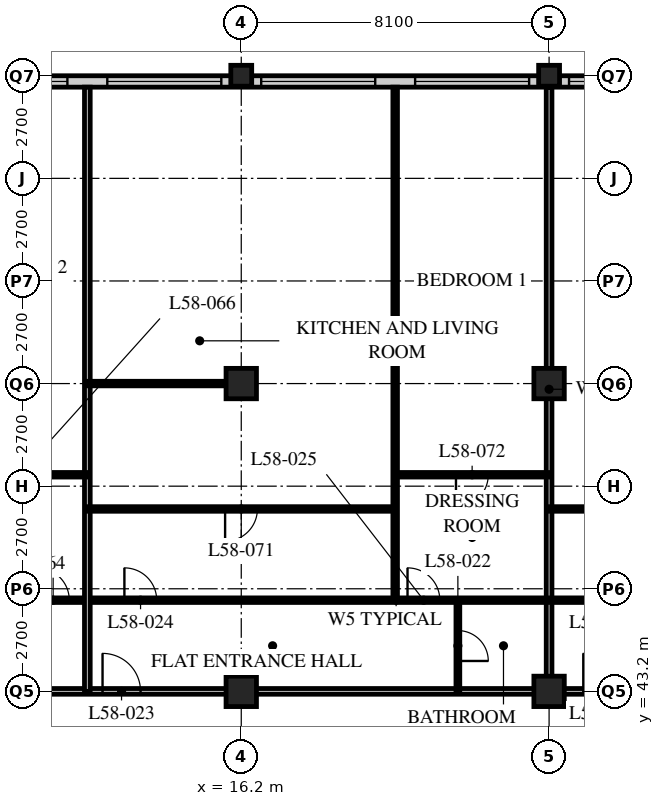
"""IFC4 building model, lengths in metres.
Left out: names, types, materials, properties, quantities, classifications, styles, units other than length and angle.
Written with IfcOpenShell. Run it as: python <this file> out.ifc"""

import sys

from ifc_helpers import new_model, si_unit, direction, frame, frame_2d, origin, origin_2d, place, context, subcontext, project, spatial, rectangle, hollow_rectangle, extrude, element, fill, save


model = new_model("IFC4")
c1 = context("Model", 3, precision=1e-05, world=origin(), true_north=direction((0.0, 1.0)))
c2 = subcontext(c1, "Body", "Model", "MODEL_VIEW")
j1 = project(units=[si_unit("LENGTHUNIT", "METRE"), si_unit("PLANEANGLEUNIT", "RADIAN")], contexts=[c1])
p1 = place(None, origin())
s1 = spatial("IfcSite", under=j1, at=p1, CompositionType="ELEMENT")
p2 = place(p1, origin())
s2 = spatial("IfcBuilding", under=s1, at=p2, CompositionType="ELEMENT")
p3 = place(p2, frame((0.0, 0.0, 224.4)))
s3 = spatial("IfcBuildingStorey", under=s2, at=p3, CompositionType="ELEMENT", Elevation=224.4)
for number, where, z_axis, x_axis in (
    (1, (16.2, 43.2, 0.0), (0.0, 0.0, 1.0), (1.0, 0.0, 0.0)),
    (2, (16.2, 51.3, 0.0), (0.0, 0.0, 1.0), (1.0, 0.0, 0.0)),
):
    element("IfcColumn", number, at=place(p3, frame(where, z_axis=z_axis, x_axis=x_axis)), inside=s3, PredefinedType="COLUMN", context=c2, shape_type="SweptSolid", body=[
        extrude(hollow_rectangle(XDim=0.8, YDim=0.8, WallThickness=0.08, at=origin_2d()), origin(), (0.0, 0.0, 1.0), 3.6),
    ])
p4 = place(p3, frame((16.2, 59.4, 0.0), z_axis=(0.0, 0.0, 1.0), x_axis=(1.0, 0.0, 0.0)))
e3 = element("IfcColumn", 3, at=p4, inside=s3, PredefinedType="COLUMN", context=c2, shape_type="SweptSolid", body=[
    extrude(hollow_rectangle(XDim=0.55, YDim=0.55, WallThickness=0.045, at=origin_2d()), origin(), (0.0, 0.0, 1.0), 3.6),
])
for number, where, z_axis, x_axis in (
    (4, (24.3, 43.2, 0.0), (0.0, 0.0, 1.0), (1.0, 0.0, 0.0)),
    (5, (24.3, 51.3, 0.0), (0.0, 0.0, 1.0), (1.0, 0.0, 0.0)),
):
    element("IfcColumn", number, at=place(p3, frame(where, z_axis=z_axis, x_axis=x_axis)), inside=s3, PredefinedType="COLUMN", context=c2, shape_type="SweptSolid", body=[
        extrude(hollow_rectangle(XDim=0.8, YDim=0.8, WallThickness=0.08, at=origin_2d()), origin(), (0.0, 0.0, 1.0), 3.6),
    ])
p5 = place(p3, frame((24.3, 59.4, 0.0), z_axis=(0.0, 0.0, 1.0), x_axis=(1.0, 0.0, 0.0)))
e6 = element("IfcColumn", 6, at=p5, inside=s3, PredefinedType="COLUMN", context=c2, shape_type="SweptSolid", body=[
    extrude(hollow_rectangle(XDim=0.55, YDim=0.55, WallThickness=0.045, at=origin_2d()), origin(), (0.0, 0.0, 1.0), 3.6),
])
p6 = place(p3, frame((48.3, 59.25, 0.0), z_axis=(0.0, 0.0, 1.0), x_axis=(-1.0, 0.0, 0.0)))
e7 = element("IfcWall", 7, at=p6, inside=s3, PredefinedType="SOLIDWALL", context=c2, shape_type="SweptSolid", body=[
    extrude(rectangle(XDim=40.2, YDim=0.3, at=frame_2d((20.1, 0.0))), origin(), (0.0, 0.0, 1.0), 3.39),
])
p7 = place(p6, frame((0.225, 0.0, 0.6)))
e8 = element("IfcOpeningElement", 8, at=p7, cuts=e7, PredefinedType="OPENING", context=c2, shape_type="SweptSolid", body=[
    extrude(rectangle(XDim=3.0, YDim=2.0, at=frame_2d((1.5, 1.0))), frame((0.0, 0.16, 0.0), z_axis=(0.0, -1.0, 0.0), x_axis=(1.0, 0.0, 0.0)), (0.0, 0.0, 1.0), 0.32),
])
p8 = place(p6, frame((4.275, 0.0, 0.6)))
e9 = element("IfcOpeningElement", 9, at=p8, cuts=e7, PredefinedType="OPENING", context=c2, shape_type="SweptSolid", body=[
    extrude(rectangle(XDim=3.0, YDim=2.0, at=frame_2d((1.5, 1.0))), frame((0.0, 0.16, 0.0), z_axis=(0.0, -1.0, 0.0), x_axis=(1.0, 0.0, 0.0)), (0.0, 0.0, 1.0), 0.32),
])
p9 = place(p6, frame((8.325, 0.0, 0.6)))
e10 = element("IfcOpeningElement", 10, at=p9, cuts=e7, PredefinedType="OPENING", context=c2, shape_type="SweptSolid", body=[
    extrude(rectangle(XDim=3.0, YDim=2.0, at=frame_2d((1.5, 1.0))), frame((0.0, 0.16, 0.0), z_axis=(0.0, -1.0, 0.0), x_axis=(1.0, 0.0, 0.0)), (0.0, 0.0, 1.0), 0.32),
])
p10 = place(p6, frame((12.375, 0.0, 0.6)))
e11 = element("IfcOpeningElement", 11, at=p10, cuts=e7, PredefinedType="OPENING", context=c2, shape_type="SweptSolid", body=[
    extrude(rectangle(XDim=3.0, YDim=2.0, at=frame_2d((1.5, 1.0))), frame((0.0, 0.16, 0.0), z_axis=(0.0, -1.0, 0.0), x_axis=(1.0, 0.0, 0.0)), (0.0, 0.0, 1.0), 0.32),
])
p11 = place(p6, frame((16.425, 0.0, 0.6)))
e12 = element("IfcOpeningElement", 12, at=p11, cuts=e7, PredefinedType="OPENING", context=c2, shape_type="SweptSolid", body=[
    extrude(rectangle(XDim=3.0, YDim=2.0, at=frame_2d((1.5, 1.0))), frame((0.0, 0.16, 0.0), z_axis=(0.0, -1.0, 0.0), x_axis=(1.0, 0.0, 0.0)), (0.0, 0.0, 1.0), 0.32),
])
p12 = place(p6, frame((20.475, 0.0, 0.6)))
e13 = element("IfcOpeningElement", 13, at=p12, cuts=e7, PredefinedType="OPENING", context=c2, shape_type="SweptSolid", body=[
    extrude(rectangle(XDim=3.0, YDim=2.0, at=frame_2d((1.5, 1.0))), frame((0.0, 0.16, 0.0), z_axis=(0.0, -1.0, 0.0), x_axis=(1.0, 0.0, 0.0)), (0.0, 0.0, 1.0), 0.32),
])
p13 = place(p6, frame((24.525, 0.0, 0.6)))
e14 = element("IfcOpeningElement", 14, at=p13, cuts=e7, PredefinedType="OPENING", context=c2, shape_type="SweptSolid", body=[
    extrude(rectangle(XDim=3.0, YDim=2.0, at=frame_2d((1.5, 1.0))), frame((0.0, 0.16, 0.0), z_axis=(0.0, -1.0, 0.0), x_axis=(1.0, 0.0, 0.0)), (0.0, 0.0, 1.0), 0.32),
])
p14 = place(p6, frame((28.575, 0.0, 0.6)))
e15 = element("IfcOpeningElement", 15, at=p14, cuts=e7, PredefinedType="OPENING", context=c2, shape_type="SweptSolid", body=[
    extrude(rectangle(XDim=3.0, YDim=2.0, at=frame_2d((1.5, 1.0))), frame((0.0, 0.16, 0.0), z_axis=(0.0, -1.0, 0.0), x_axis=(1.0, 0.0, 0.0)), (0.0, 0.0, 1.0), 0.32),
])
p15 = place(p6, frame((32.625, 0.0, 0.6)))
e16 = element("IfcOpeningElement", 16, at=p15, cuts=e7, PredefinedType="OPENING", context=c2, shape_type="SweptSolid", body=[
    extrude(rectangle(XDim=3.0, YDim=2.0, at=frame_2d((1.5, 1.0))), frame((0.0, 0.16, 0.0), z_axis=(0.0, -1.0, 0.0), x_axis=(1.0, 0.0, 0.0)), (0.0, 0.0, 1.0), 0.32),
])
p16 = place(p6, frame((36.675, 0.0, 0.6)))
e17 = element("IfcOpeningElement", 17, at=p16, cuts=e7, PredefinedType="OPENING", context=c2, shape_type="SweptSolid", body=[
    extrude(rectangle(XDim=3.0, YDim=2.0, at=frame_2d((1.5, 1.0))), frame((0.0, 0.16, 0.0), z_axis=(0.0, -1.0, 0.0), x_axis=(1.0, 0.0, 0.0)), (0.0, 0.0, 1.0), 0.32),
])
p17 = place(p3, frame((8.1, 43.2, 0.0), z_axis=(0.0, 0.0, 1.0), x_axis=(1.0, 0.0, 0.0)))
e18 = element("IfcWall", 18, at=p17, inside=s3, PredefinedType="PARTITIONING", context=c2, shape_type="SweptSolid", body=[
    extrude(rectangle(XDim=36.45, YDim=0.15, at=frame_2d((18.225, 0.0))), origin(), (0.0, 0.0, 1.0), 2.628),
])
p18 = place(p17, frame((4.45, 0.0, 0.0)))
e19 = element("IfcOpeningElement", 19, at=p18, cuts=e18, PredefinedType="OPENING", context=c2, shape_type="SweptSolid", body=[
    extrude(rectangle(XDim=1.0, YDim=2.1, at=frame_2d((0.5, 1.05))), frame((0.0, 0.085, 0.0), z_axis=(0.0, -1.0, 0.0), x_axis=(1.0, 0.0, 0.0)), (0.0, 0.0, 1.0), 0.17),
])
p19 = place(p17, frame((17.1, 0.0, 0.0)))
e20 = element("IfcOpeningElement", 20, at=p19, cuts=e18, PredefinedType="OPENING", context=c2, shape_type="SweptSolid", body=[
    extrude(rectangle(XDim=1.0, YDim=2.1, at=frame_2d((0.5, 1.05))), frame((0.0, 0.085, 0.0), z_axis=(0.0, -1.0, 0.0), x_axis=(1.0, 0.0, 0.0)), (0.0, 0.0, 1.0), 0.17),
])
p20 = place(p17, frame((29.05, 0.0, 0.0)))
e21 = element("IfcOpeningElement", 21, at=p20, cuts=e18, PredefinedType="OPENING", context=c2, shape_type="SweptSolid", body=[
    extrude(rectangle(XDim=1.0, YDim=2.1, at=frame_2d((0.5, 1.05))), frame((0.0, 0.085, 0.0), z_axis=(0.0, -1.0, 0.0), x_axis=(1.0, 0.0, 0.0)), (0.0, 0.0, 1.0), 0.17),
])
p21 = place(p17, frame((33.925, 0.0, 0.0)))
e22 = element("IfcOpeningElement", 22, at=p21, cuts=e18, PredefinedType="OPENING", context=c2, shape_type="SweptSolid", body=[
    extrude(rectangle(XDim=1.0, YDim=2.1, at=frame_2d((0.5, 1.05))), frame((0.0, 0.085, 0.0), z_axis=(0.0, -1.0, 0.0), x_axis=(1.0, 0.0, 0.0)), (0.0, 0.0, 1.0), 0.17),
])
p22 = place(p17, frame((1.525, 0.0, 0.0)))
e23 = element("IfcOpeningElement", 23, at=p22, cuts=e18, PredefinedType="OPENING", context=c2, shape_type="SweptSolid", body=[
    extrude(rectangle(XDim=1.0, YDim=2.1, at=frame_2d((0.5, 1.05))), frame((0.0, 0.085, 0.0), z_axis=(0.0, -1.0, 0.0), x_axis=(1.0, 0.0, 0.0)), (0.0, 0.0, 1.0), 0.17),
])
p23 = place(p3, frame((21.9, 43.2, 0.0), z_axis=(0.0, 0.0, 1.0), x_axis=(0.0, 1.0, 0.0)))
e24 = element("IfcWall", 24, at=p23, inside=s3, PredefinedType="PARTITIONING", context=c2, shape_type="SweptSolid", body=[
    extrude(rectangle(XDim=2.4, YDim=0.1, at=frame_2d((1.2, 0.0))), origin(), (0.0, 0.0, 1.0), 3.39),
])
p24 = place(p23, frame((0.8, 0.0, 0.0)))
e25 = element("IfcOpeningElement", 25, at=p24, cuts=e24, PredefinedType="OPENING", context=c2, shape_type="SweptSolid", body=[
    extrude(rectangle(XDim=0.8, YDim=2.1, at=frame_2d((0.4, 1.05))), frame((0.0, 0.06, 0.0), z_axis=(0.0, -1.0, 0.0), x_axis=(1.0, 0.0, 0.0)), (0.0, 0.0, 1.0), 0.12),
])
p25 = place(p3, frame((20.25, 45.6, 0.0), z_axis=(0.0, 0.0, 1.0), x_axis=(0.0, 1.0, 0.0)))
e26 = element("IfcWall", 26, at=p25, inside=s3, PredefinedType="PARTITIONING", context=c2, shape_type="SweptSolid", body=[
    extrude(rectangle(XDim=13.5, YDim=0.12, at=frame_2d((6.75, 0.0))), origin(), (0.0, 0.0, 1.0), 3.39),
])
p26 = place(p3, frame((24.3, 43.2, 0.0), z_axis=(0.0, 0.0, 1.0), x_axis=(0.0, 1.0, 0.0)))
e27 = element("IfcWall", 27, at=p26, inside=s3, PredefinedType="PARTITIONING", context=c2, shape_type="SweptSolid", body=[
    extrude(rectangle(XDim=15.9, YDim=0.15, at=frame_2d((7.95, 0.0))), origin(), (0.0, 0.0, 1.0), 2.628),
])
p27 = place(p3, frame((4.1, 45.6, 0.0), z_axis=(0.0, 0.0, 1.0), x_axis=(1.0, 0.0, 0.0)))
e28 = element("IfcWall", 28, at=p27, inside=s3, PredefinedType="PARTITIONING", context=c2, shape_type="SweptSolid", body=[
    extrude(rectangle(XDim=32.35, YDim=0.12, at=frame_2d((16.175, 0.0))), origin(), (0.0, 0.0, 1.0), 3.39),
])
p28 = place(p27, frame((9.025, 0.0, 0.0)))
e29 = element("IfcOpeningElement", 29, at=p28, cuts=e28, PredefinedType="OPENING", context=c2, shape_type="SweptSolid", body=[
    extrude(rectangle(XDim=0.85, YDim=2.1, at=frame_2d((0.425, 1.05))), frame((0.0, 0.07, 0.0), z_axis=(0.0, -1.0, 0.0), x_axis=(1.0, 0.0, 0.0)), (0.0, 0.0, 1.0), 0.14),
])
p29 = place(p27, frame((16.475, 0.0, 0.0)))
e30 = element("IfcOpeningElement", 30, at=p29, cuts=e28, PredefinedType="OPENING", context=c2, shape_type="SweptSolid", body=[
    extrude(rectangle(XDim=0.85, YDim=2.1, at=frame_2d((0.425, 1.05))), frame((0.0, 0.07, 0.0), z_axis=(0.0, -1.0, 0.0), x_axis=(1.0, 0.0, 0.0)), (0.0, 0.0, 1.0), 0.14),
])
p30 = place(p27, frame((21.175, 0.0, 0.0)))
e31 = element("IfcOpeningElement", 31, at=p30, cuts=e28, PredefinedType="OPENING", context=c2, shape_type="SweptSolid", body=[
    extrude(rectangle(XDim=0.85, YDim=2.1, at=frame_2d((0.425, 1.05))), frame((0.0, 0.07, 0.0), z_axis=(0.0, -1.0, 0.0), x_axis=(1.0, 0.0, 0.0)), (0.0, 0.0, 1.0), 0.14),
])
p31 = place(p27, frame((28.625, 0.0, 0.0)))
e32 = element("IfcOpeningElement", 32, at=p31, cuts=e28, PredefinedType="OPENING", context=c2, shape_type="SweptSolid", body=[
    extrude(rectangle(XDim=0.85, YDim=2.1, at=frame_2d((0.425, 1.05))), frame((0.0, 0.07, 0.0), z_axis=(0.0, -1.0, 0.0), x_axis=(1.0, 0.0, 0.0)), (0.0, 0.0, 1.0), 0.14),
])
p32 = place(p27, frame((6.725, 0.0, 0.0)))
e33 = element("IfcOpeningElement", 33, at=p32, cuts=e28, PredefinedType="OPENING", context=c2, shape_type="SweptSolid", body=[
    extrude(rectangle(XDim=0.85, YDim=2.1, at=frame_2d((0.425, 1.05))), frame((0.0, 0.07, 0.0), z_axis=(0.0, -1.0, 0.0), x_axis=(1.0, 0.0, 0.0)), (0.0, 0.0, 1.0), 0.14),
])
p33 = place(p27, frame((2.875, 0.0, 0.0)))
e34 = element("IfcOpeningElement", 34, at=p33, cuts=e28, PredefinedType="OPENING", context=c2, shape_type="SweptSolid", body=[
    extrude(rectangle(XDim=0.85, YDim=2.1, at=frame_2d((0.425, 1.05))), frame((0.0, 0.07, 0.0), z_axis=(0.0, -1.0, 0.0), x_axis=(1.0, 0.0, 0.0)), (0.0, 0.0, 1.0), 0.14),
])
p34 = place(p3, frame((12.15, 43.2, 0.0), z_axis=(0.0, 0.0, 1.0), x_axis=(0.0, 1.0, 0.0)))
e35 = element("IfcWall", 35, at=p34, inside=s3, PredefinedType="PARTITIONING", context=c2, shape_type="SweptSolid", body=[
    extrude(rectangle(XDim=15.9, YDim=0.15, at=frame_2d((7.95, 0.0))), origin(), (0.0, 0.0, 1.0), 3.39),
])
p35 = place(p3, frame((12.15, 48.0, 0.0), z_axis=(0.0, 0.0, 1.0), x_axis=(1.0, 0.0, 0.0)))
e36 = element("IfcWall", 36, at=p35, inside=s3, PredefinedType="PARTITIONING", context=c2, shape_type="SweptSolid", body=[
    extrude(rectangle(XDim=8.1, YDim=0.12, at=frame_2d((4.05, 0.0))), origin(), (0.0, 0.0, 1.0), 3.39),
])
p36 = place(p35, frame((3.625, 0.0, 0.0)))
e37 = element("IfcOpeningElement", 37, at=p36, cuts=e36, PredefinedType="OPENING", context=c2, shape_type="SweptSolid", body=[
    extrude(rectangle(XDim=0.85, YDim=2.1, at=frame_2d((0.425, 1.05))), frame((0.0, 0.07, 0.0), z_axis=(0.0, -1.0, 0.0), x_axis=(1.0, 0.0, 0.0)), (0.0, 0.0, 1.0), 0.14),
])
p37 = place(p3, frame((20.25, 48.9, 0.0), z_axis=(0.0, 0.0, 1.0), x_axis=(1.0, 0.0, 0.0)))
e38 = element("IfcWall", 38, at=p37, inside=s3, PredefinedType="PARTITIONING", context=c2, shape_type="SweptSolid", body=[
    extrude(rectangle(XDim=4.05, YDim=0.12, at=frame_2d((2.025, 0.0))), origin(), (0.0, 0.0, 1.0), 3.39),
])
p38 = place(p37, frame((1.6, 0.0, 0.0)))
e39 = element("IfcOpeningElement", 39, at=p38, cuts=e38, PredefinedType="OPENING", context=c2, shape_type="SweptSolid", body=[
    extrude(rectangle(XDim=0.85, YDim=2.1, at=frame_2d((0.425, 1.05))), frame((0.0, 0.07, 0.0), z_axis=(0.0, -1.0, 0.0), x_axis=(1.0, 0.0, 0.0)), (0.0, 0.0, 1.0), 0.14),
])
p39 = place(p3, frame((24.3, 48.0, 0.0), z_axis=(0.0, 0.0, 1.0), x_axis=(1.0, 0.0, 0.0)))
e40 = element("IfcWall", 40, at=p39, inside=s3, PredefinedType="PARTITIONING", context=c2, shape_type="SweptSolid", body=[
    extrude(rectangle(XDim=8.1, YDim=0.12, at=frame_2d((4.05, 0.0))), origin(), (0.0, 0.0, 1.0), 3.39),
])
p40 = place(p39, frame((3.625, 0.0, 0.0)))
e41 = element("IfcOpeningElement", 41, at=p40, cuts=e40, PredefinedType="OPENING", context=c2, shape_type="SweptSolid", body=[
    extrude(rectangle(XDim=0.85, YDim=2.1, at=frame_2d((0.425, 1.05))), frame((0.0, 0.07, 0.0), z_axis=(0.0, -1.0, 0.0), x_axis=(1.0, 0.0, 0.0)), (0.0, 0.0, 1.0), 0.14),
])
p41 = place(p3, frame((8.1, 48.9, 0.0), z_axis=(0.0, 0.0, 1.0), x_axis=(1.0, 0.0, 0.0)))
e42 = element("IfcWall", 42, at=p41, inside=s3, PredefinedType="PARTITIONING", context=c2, shape_type="SweptSolid", body=[
    extrude(rectangle(XDim=4.05, YDim=0.12, at=frame_2d((2.025, 0.0))), origin(), (0.0, 0.0, 1.0), 3.39),
])
p42 = place(p41, frame((1.6, 0.0, 0.0)))
e43 = element("IfcOpeningElement", 43, at=p42, cuts=e42, PredefinedType="OPENING", context=c2, shape_type="SweptSolid", body=[
    extrude(rectangle(XDim=0.85, YDim=2.1, at=frame_2d((0.425, 1.05))), frame((0.0, 0.07, 0.0), z_axis=(0.0, -1.0, 0.0), x_axis=(1.0, 0.0, 0.0)), (0.0, 0.0, 1.0), 0.14),
])
p43 = place(p3, frame((12.15, 51.3, 0.0), z_axis=(0.0, 0.0, 1.0), x_axis=(1.0, 0.0, 0.0)))
e44 = element("IfcWall", 44, at=p43, inside=s3, PredefinedType="PARTITIONING", context=c2, shape_type="SweptSolid", body=[
    extrude(rectangle(XDim=3.65, YDim=0.12, at=frame_2d((1.825, 0.0))), origin(), (0.0, 0.0, 1.0), 2.628),
])
p44 = place(p12, origin())
e45 = element("IfcWindow", 45, at=p44, inside=s3, PartitioningType="SINGLE_PANEL", PredefinedType="WINDOW", context=c2, shape_type="SweptSolid", body=[
    extrude(rectangle(XDim=3.0, YDim=2.0, at=frame_2d((1.5, 1.0))), frame((0.0, 0.03, 0.0), z_axis=(0.0, -1.0, 0.0), x_axis=(1.0, 0.0, 0.0)), (0.0, 0.0, 1.0), 0.06),
])
fill(e13, e45)
p45 = place(p13, origin())
e46 = element("IfcWindow", 46, at=p45, inside=s3, PartitioningType="SINGLE_PANEL", PredefinedType="WINDOW", context=c2, shape_type="SweptSolid", body=[
    extrude(rectangle(XDim=3.0, YDim=2.0, at=frame_2d((1.5, 1.0))), frame((0.0, 0.03, 0.0), z_axis=(0.0, -1.0, 0.0), x_axis=(1.0, 0.0, 0.0)), (0.0, 0.0, 1.0), 0.06),
])
fill(e14, e46)
p46 = place(p14, origin())
e47 = element("IfcWindow", 47, at=p46, inside=s3, PartitioningType="SINGLE_PANEL", PredefinedType="WINDOW", context=c2, shape_type="SweptSolid", body=[
    extrude(rectangle(XDim=3.0, YDim=2.0, at=frame_2d((1.5, 1.0))), frame((0.0, 0.03, 0.0), z_axis=(0.0, -1.0, 0.0), x_axis=(1.0, 0.0, 0.0)), (0.0, 0.0, 1.0), 0.06),
])
fill(e15, e47)
p47 = place(p15, origin())
e48 = element("IfcWindow", 48, at=p47, inside=s3, PartitioningType="SINGLE_PANEL", PredefinedType="WINDOW", context=c2, shape_type="SweptSolid", body=[
    extrude(rectangle(XDim=3.0, YDim=2.0, at=frame_2d((1.5, 1.0))), frame((0.0, 0.03, 0.0), z_axis=(0.0, -1.0, 0.0), x_axis=(1.0, 0.0, 0.0)), (0.0, 0.0, 1.0), 0.06),
])
fill(e16, e48)
p48 = place(p16, origin())
e49 = element("IfcWindow", 49, at=p48, inside=s3, PartitioningType="SINGLE_PANEL", PredefinedType="WINDOW", context=c2, shape_type="SweptSolid", body=[
    extrude(rectangle(XDim=3.0, YDim=2.0, at=frame_2d((1.5, 1.0))), frame((0.0, 0.03, 0.0), z_axis=(0.0, -1.0, 0.0), x_axis=(1.0, 0.0, 0.0)), (0.0, 0.0, 1.0), 0.06),
])
fill(e17, e49)
p49 = place(p24, origin())
e50 = element("IfcDoor", 50, at=p49, inside=s3, OperationType="SINGLE_SWING_RIGHT", PredefinedType="DOOR", context=c2, shape_type="SweptSolid", body=[
    extrude(rectangle(XDim=0.8, YDim=2.1, at=frame_2d((0.4, 1.05))), frame((0.0, 0.025, 0.0), z_axis=(0.0, -1.0, 0.0), x_axis=(1.0, 0.0, 0.0)), (0.0, 0.0, 1.0), 0.05),
])
fill(e25, e50)
p50 = place(p18, origin())
e51 = element("IfcDoor", 51, at=p50, inside=s3, OperationType="SINGLE_SWING_LEFT", PredefinedType="DOOR", context=c2, shape_type="SweptSolid", body=[
    extrude(rectangle(XDim=1.0, YDim=2.1, at=frame_2d((0.5, 1.05))), frame((0.0, 0.025, 0.0), z_axis=(0.0, -1.0, 0.0), x_axis=(1.0, 0.0, 0.0)), (0.0, 0.0, 1.0), 0.05),
])
fill(e19, e51)
p51 = place(p28, origin())
e52 = element("IfcDoor", 52, at=p51, inside=s3, OperationType="SINGLE_SWING_LEFT", PredefinedType="DOOR", context=c2, shape_type="SweptSolid", body=[
    extrude(rectangle(XDim=0.85, YDim=2.1, at=frame_2d((0.425, 1.05))), frame((0.0, 0.025, 0.0), z_axis=(0.0, -1.0, 0.0), x_axis=(1.0, 0.0, 0.0)), (0.0, 0.0, 1.0), 0.05),
])
fill(e29, e52)
p52 = place(p29, origin())
e53 = element("IfcDoor", 53, at=p52, inside=s3, OperationType="SINGLE_SWING_LEFT", PredefinedType="DOOR", context=c2, shape_type="SweptSolid", body=[
    extrude(rectangle(XDim=0.85, YDim=2.1, at=frame_2d((0.425, 1.05))), frame((0.0, 0.025, 0.0), z_axis=(0.0, -1.0, 0.0), x_axis=(1.0, 0.0, 0.0)), (0.0, 0.0, 1.0), 0.05),
])
fill(e30, e53)
p53 = place(p19, origin())
e54 = element("IfcDoor", 54, at=p53, inside=s3, OperationType="SINGLE_SWING_LEFT", PredefinedType="DOOR", context=c2, shape_type="SweptSolid", body=[
    extrude(rectangle(XDim=1.0, YDim=2.1, at=frame_2d((0.5, 1.05))), frame((0.0, 0.025, 0.0), z_axis=(0.0, -1.0, 0.0), x_axis=(1.0, 0.0, 0.0)), (0.0, 0.0, 1.0), 0.05),
])
fill(e20, e54)
p54 = place(p32, origin())
e55 = element("IfcDoor", 55, at=p54, inside=s3, OperationType="SINGLE_SWING_LEFT", PredefinedType="DOOR", context=c2, shape_type="SweptSolid", body=[
    extrude(rectangle(XDim=0.85, YDim=2.1, at=frame_2d((0.425, 1.05))), frame((0.0, 0.025, 0.0), z_axis=(0.0, -1.0, 0.0), x_axis=(1.0, 0.0, 0.0)), (0.0, 0.0, 1.0), 0.05),
])
fill(e33, e55)
p55 = place(p36, origin())
e56 = element("IfcDoor", 56, at=p55, inside=s3, OperationType="SINGLE_SWING_RIGHT", PredefinedType="DOOR", context=c2, shape_type="SweptSolid", body=[
    extrude(rectangle(XDim=0.85, YDim=2.1, at=frame_2d((0.425, 1.05))), frame((0.0, 0.025, 0.0), z_axis=(0.0, -1.0, 0.0), x_axis=(1.0, 0.0, 0.0)), (0.0, 0.0, 1.0), 0.05),
])
fill(e37, e56)
p56 = place(p38, origin())
e57 = element("IfcDoor", 57, at=p56, inside=s3, OperationType="SINGLE_SWING_RIGHT", PredefinedType="DOOR", context=c2, shape_type="SweptSolid", body=[
    extrude(rectangle(XDim=0.85, YDim=2.1, at=frame_2d((0.425, 1.05))), frame((0.0, 0.025, 0.0), z_axis=(0.0, -1.0, 0.0), x_axis=(1.0, 0.0, 0.0)), (0.0, 0.0, 1.0), 0.05),
])
fill(e39, e57)
save(model, sys.argv[1])
